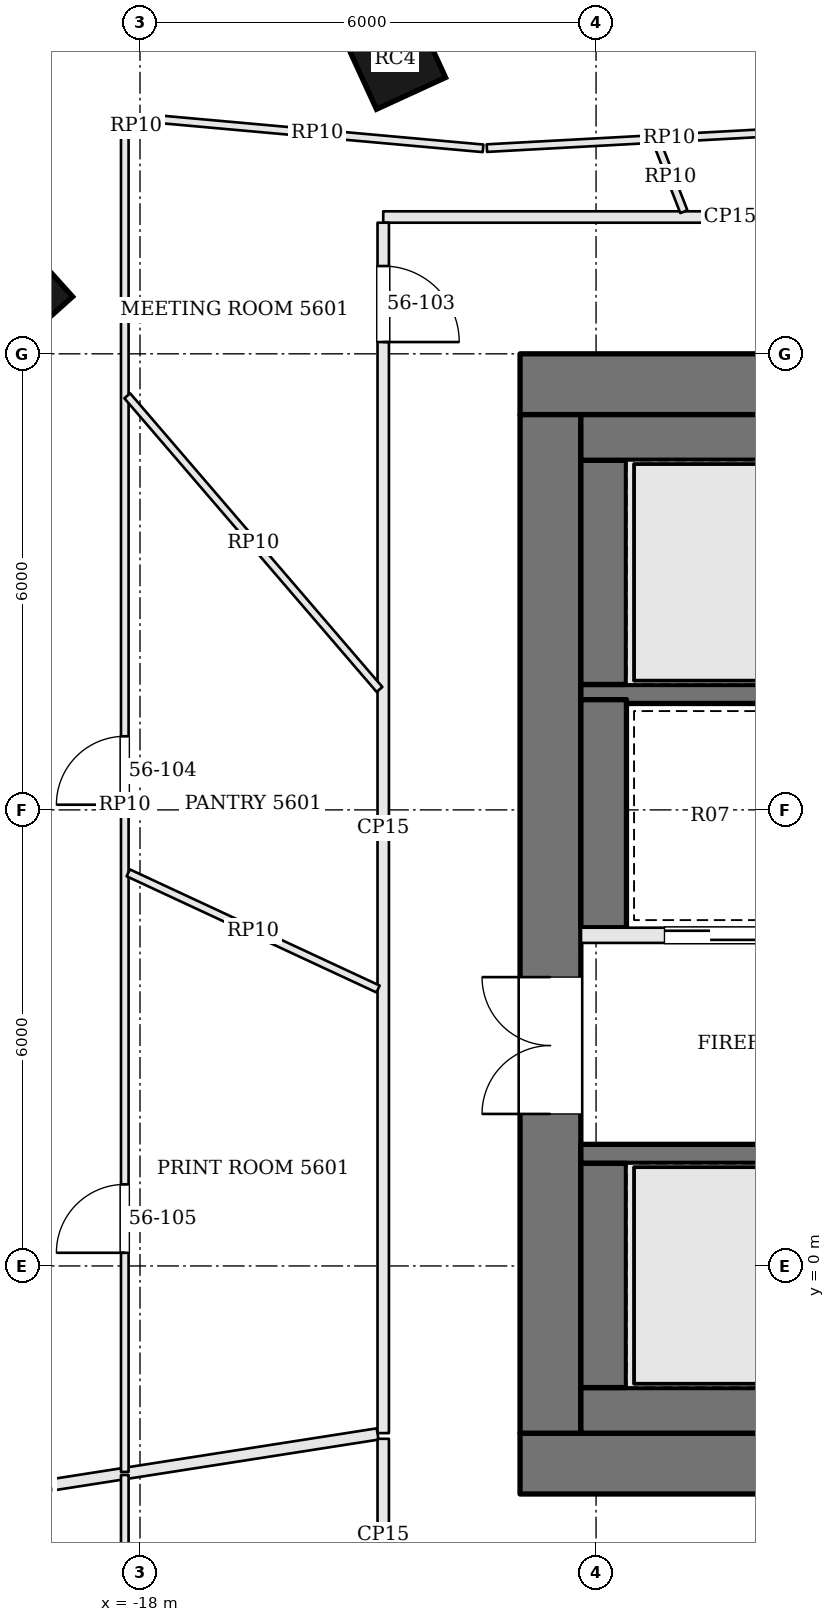
"""IFC4 building model, lengths in metres.
Left out: names, types, materials, properties, quantities, classifications, styles, units other than length and angle.
Written with IfcOpenShell. Run it as: python <this file> out.ifc"""

import sys

from ifc_helpers import new_model, si_unit, direction, frame, frame_2d, origin, origin_2d, place, context, subcontext, project, spatial, rectangle, extrude, element, fill, save


model = new_model("IFC4")
c1 = context("Model", 3, precision=1e-05, world=origin(), true_north=direction((0.0, 1.0)))
c2 = subcontext(c1, "Body", "Model", "MODEL_VIEW")
j1 = project(units=[si_unit("LENGTHUNIT", "METRE"), si_unit("PLANEANGLEUNIT", "RADIAN")], contexts=[c1])
p1 = place(None, origin())
s1 = spatial("IfcSite", under=j1, at=p1, CompositionType="ELEMENT")
p2 = place(p1, origin())
s2 = spatial("IfcBuilding", under=s1, at=p2, CompositionType="ELEMENT")
p3 = place(p2, frame((0.0, 0.0, 229.2)))
s3 = spatial("IfcBuildingStorey", under=s2, at=p3, CompositionType="ELEMENT", Elevation=229.2)
p4 = place(p3, frame((-13.0, 11.6, 0.0), z_axis=(0.0, 0.0, 1.0), x_axis=(1.0, 0.0, 0.0)))
e1 = element("IfcWall", 1, at=p4, inside=s3, PredefinedType="SHEAR", context=c2, shape_type="SweptSolid", body=[
    extrude(rectangle(XDim=26.0, YDim=0.8, at=frame_2d((13.0, 0.0))), origin(), (0.0, 0.0, 1.0), 3.9),
])
p5 = place(p4, frame((8.575, 0.0, 0.0)))
e2 = element("IfcOpeningElement", 2, at=p5, cuts=e1, PredefinedType="OPENING", context=c2, shape_type="SweptSolid", body=[
    extrude(rectangle(XDim=0.7, YDim=2.1, at=frame_2d((0.35, 1.05))), frame((0.0, 0.41, 0.0), z_axis=(0.0, -1.0, 0.0), x_axis=(1.0, 0.0, 0.0)), (0.0, 0.0, 1.0), 0.82),
])
p6 = place(p4, frame((10.625, 0.0, 0.0)))
e3 = element("IfcOpeningElement", 3, at=p6, cuts=e1, PredefinedType="OPENING", context=c2, shape_type="SweptSolid", body=[
    extrude(rectangle(XDim=0.7, YDim=2.1, at=frame_2d((0.35, 1.05))), frame((0.0, 0.41, 0.0), z_axis=(0.0, -1.0, 0.0), x_axis=(1.0, 0.0, 0.0)), (0.0, 0.0, 1.0), 0.82),
])
p7 = place(p4, frame((13.325, 0.0, 0.0)))
e4 = element("IfcOpeningElement", 4, at=p7, cuts=e1, PredefinedType="OPENING", context=c2, shape_type="SweptSolid", body=[
    extrude(rectangle(XDim=1.0, YDim=2.1, at=frame_2d((0.5, 1.05))), frame((0.0, 0.41, 0.0), z_axis=(0.0, -1.0, 0.0), x_axis=(1.0, 0.0, 0.0)), (0.0, 0.0, 1.0), 0.82),
])
p8 = place(p4, frame((15.65, 0.0, 0.0)))
e5 = element("IfcOpeningElement", 5, at=p8, cuts=e1, PredefinedType="OPENING", context=c2, shape_type="SweptSolid", body=[
    extrude(rectangle(XDim=1.0, YDim=2.1, at=frame_2d((0.5, 1.05))), frame((0.0, 0.41, 0.0), z_axis=(0.0, -1.0, 0.0), x_axis=(1.0, 0.0, 0.0)), (0.0, 0.0, 1.0), 0.82),
])
p9 = place(p3, frame((-13.0, -2.6, 0.0), z_axis=(0.0, 0.0, 1.0), x_axis=(1.0, 0.0, 0.0)))
e6 = element("IfcWall", 6, at=p9, inside=s3, PredefinedType="SHEAR", context=c2, shape_type="SweptSolid", body=[
    extrude(rectangle(XDim=26.0, YDim=0.8, at=frame_2d((13.0, 0.0))), origin(), (0.0, 0.0, 1.0), 3.9),
])
p10 = place(p9, frame((9.475, 0.0, 0.0)))
e7 = element("IfcOpeningElement", 7, at=p10, cuts=e6, PredefinedType="OPENING", context=c2, shape_type="SweptSolid", body=[
    extrude(rectangle(XDim=0.9, YDim=2.1, at=frame_2d((0.45, 1.05))), frame((0.0, 0.41, 0.0), z_axis=(0.0, -1.0, 0.0), x_axis=(1.0, 0.0, 0.0)), (0.0, 0.0, 1.0), 0.82),
])
p11 = place(p9, frame((12.75, 0.0, 0.0)))
e8 = element("IfcOpeningElement", 8, at=p11, cuts=e6, PredefinedType="OPENING", context=c2, shape_type="SweptSolid", body=[
    extrude(rectangle(XDim=0.9, YDim=2.1, at=frame_2d((0.45, 1.05))), frame((0.0, 0.41, 0.0), z_axis=(0.0, -1.0, 0.0), x_axis=(1.0, 0.0, 0.0)), (0.0, 0.0, 1.0), 0.82),
])
p12 = place(p9, frame((15.05, 0.0, 0.0)))
e9 = element("IfcOpeningElement", 9, at=p12, cuts=e6, PredefinedType="OPENING", context=c2, shape_type="SweptSolid", body=[
    extrude(rectangle(XDim=1.0, YDim=2.1, at=frame_2d((0.5, 1.05))), frame((0.0, 0.41, 0.0), z_axis=(0.0, -1.0, 0.0), x_axis=(1.0, 0.0, 0.0)), (0.0, 0.0, 1.0), 0.82),
])
p13 = place(p9, frame((16.825, 0.0, 0.0)))
e10 = element("IfcOpeningElement", 10, at=p13, cuts=e6, PredefinedType="OPENING", context=c2, shape_type="SweptSolid", body=[
    extrude(rectangle(XDim=0.7, YDim=2.1, at=frame_2d((0.35, 1.05))), frame((0.0, 0.41, 0.0), z_axis=(0.0, -1.0, 0.0), x_axis=(1.0, 0.0, 0.0)), (0.0, 0.0, 1.0), 0.82),
])
p14 = place(p3, frame((-12.6, -2.2, 0.0), z_axis=(0.0, 0.0, 1.0), x_axis=(0.0, 1.0, 0.0)))
e11 = element("IfcWall", 11, at=p14, inside=s3, PredefinedType="SHEAR", context=c2, shape_type="SweptSolid", body=[
    extrude(rectangle(XDim=13.4, YDim=0.8, at=frame_2d((6.7, 0.0))), origin(), (0.0, 0.0, 1.0), 3.9),
])
p15 = place(p14, frame((4.2, 0.0, 0.0)))
e12 = element("IfcOpeningElement", 12, at=p15, cuts=e11, PredefinedType="OPENING", context=c2, shape_type="SweptSolid", body=[
    extrude(rectangle(XDim=1.8, YDim=2.1, at=frame_2d((0.9, 1.05))), frame((0.0, 0.41, 0.0), z_axis=(0.0, -1.0, 0.0), x_axis=(1.0, 0.0, 0.0)), (0.0, 0.0, 1.0), 0.82),
])
for number, where, z_axis, x_axis in (
    (13, (-14.643, 15.881, 0.0), (0.0, 0.0, 1.0), (-0.909, -0.417, 0.0)),
    (14, (-19.593, 12.79, 0.0), (0.0, 0.0, 1.0), (-0.744, -0.668, 0.0)),
):
    element("IfcColumn", number, at=place(p3, frame(where, z_axis=z_axis, x_axis=x_axis)), inside=s3, PredefinedType="COLUMN", context=c2, shape_type="SweptSolid", body=[
        extrude(rectangle(XDim=1.0, YDim=1.0, at=origin_2d()), origin(), (0.0, 0.0, 1.0), 3.9),
    ])
p16 = place(p3, frame((-12.2, 1.475, 0.0), z_axis=(0.0, 0.0, 1.0), x_axis=(1.0, 0.0, 0.0)))
e15 = element("IfcWall", 15, at=p16, inside=s3, PredefinedType="SOLIDWALL", context=c2, shape_type="SweptSolid", body=[
    extrude(rectangle(XDim=7.1, YDim=0.25, at=frame_2d((3.55, 0.0))), origin(), (0.0, 0.0, 1.0), 3.7),
])
p17 = place(p16, frame((5.8, 0.0, 0.0)))
e16 = element("IfcOpeningElement", 16, at=p17, cuts=e15, PredefinedType="OPENING", context=c2, shape_type="SweptSolid", body=[
    extrude(rectangle(XDim=1.2, YDim=2.1, at=frame_2d((0.6, 1.05))), frame((0.0, 0.135, 0.0), z_axis=(0.0, -1.0, 0.0), x_axis=(1.0, 0.0, 0.0)), (0.0, 0.0, 1.0), 0.27),
])
p18 = place(p3, frame((-12.2, 4.35, 0.0), z_axis=(0.0, 0.0, 1.0), x_axis=(1.0, 0.0, 0.0)))
e17 = element("IfcWall", 17, at=p18, inside=s3, PredefinedType="SOLIDWALL", context=c2, shape_type="SweptSolid", body=[
    extrude(rectangle(XDim=7.1, YDim=0.2, at=frame_2d((3.55, 0.0))), origin(), (0.0, 0.0, 1.0), 3.7),
])
p19 = place(p18, frame((4.4, 0.0, 0.0)))
e18 = element("IfcOpeningElement", 18, at=p19, cuts=e17, PredefinedType="OPENING", context=c2, shape_type="SweptSolid", body=[
    extrude(rectangle(XDim=1.2, YDim=2.1, at=frame_2d((0.6, 1.05))), frame((0.0, 0.11, 0.0), z_axis=(0.0, -1.0, 0.0), x_axis=(1.0, 0.0, 0.0)), (0.0, 0.0, 1.0), 0.22),
])
p20 = place(p18, frame((1.1, 0.0, 0.0)))
e19 = element("IfcOpeningElement", 19, at=p20, cuts=e17, PredefinedType="OPENING", context=c2, shape_type="SweptSolid", body=[
    extrude(rectangle(XDim=1.2, YDim=2.1, at=frame_2d((0.6, 1.05))), frame((0.0, 0.11, 0.0), z_axis=(0.0, -1.0, 0.0), x_axis=(1.0, 0.0, 0.0)), (0.0, 0.0, 1.0), 0.22),
])
p21 = place(p3, frame((-12.2, 7.525, 0.0), z_axis=(0.0, 0.0, 1.0), x_axis=(1.0, 0.0, 0.0)))
e20 = element("IfcWall", 20, at=p21, inside=s3, PredefinedType="SOLIDWALL", context=c2, shape_type="SweptSolid", body=[
    extrude(rectangle(XDim=7.1, YDim=0.25, at=frame_2d((3.55, 0.0))), origin(), (0.0, 0.0, 1.0), 3.7),
])
p22 = place(p21, frame((5.8, 0.0, 0.0)))
e21 = element("IfcOpeningElement", 21, at=p22, cuts=e20, PredefinedType="OPENING", context=c2, shape_type="SweptSolid", body=[
    extrude(rectangle(XDim=1.2, YDim=2.1, at=frame_2d((0.6, 1.05))), frame((0.0, 0.135, 0.0), z_axis=(0.0, -1.0, 0.0), x_axis=(1.0, 0.0, 0.0)), (0.0, 0.0, 1.0), 0.27),
])
p23 = place(p3, frame((-12.2, -1.9, 0.0), z_axis=(0.0, 0.0, 1.0), x_axis=(1.0, 0.0, 0.0)))
e22 = element("IfcWall", 22, at=p23, inside=s3, PredefinedType="SOLIDWALL", context=c2, shape_type="SweptSolid", body=[
    extrude(rectangle(XDim=7.1, YDim=0.6, at=frame_2d((3.55, 0.0))), origin(), (0.0, 0.0, 1.0), 3.7),
])
p24 = place(p3, frame((-11.9, -1.6, 0.0), z_axis=(0.0, 0.0, 1.0), x_axis=(0.0, 1.0, 0.0)))
e23 = element("IfcWall", 23, at=p24, inside=s3, PredefinedType="SOLIDWALL", context=c2, shape_type="SweptSolid", body=[
    extrude(rectangle(XDim=2.95, YDim=0.6, at=frame_2d((1.475, 0.0))), origin(), (0.0, 0.0, 1.0), 3.7),
])
p25 = place(p3, frame((-11.9, 4.45, 0.0), z_axis=(0.0, 0.0, 1.0), x_axis=(0.0, 1.0, 0.0)))
e24 = element("IfcWall", 24, at=p25, inside=s3, PredefinedType="SOLIDWALL", context=c2, shape_type="SweptSolid", body=[
    extrude(rectangle(XDim=3.0, YDim=0.6, at=frame_2d((1.5, 0.0))), origin(), (0.0, 0.0, 1.0), 3.7),
])
p26 = place(p3, frame((-11.9, 7.65, 0.0), z_axis=(0.0, 0.0, 1.0), x_axis=(0.0, 1.0, 0.0)))
e25 = element("IfcWall", 25, at=p26, inside=s3, PredefinedType="SOLIDWALL", context=c2, shape_type="SweptSolid", body=[
    extrude(rectangle(XDim=2.95, YDim=0.6, at=frame_2d((1.475, 0.0))), origin(), (0.0, 0.0, 1.0), 3.7),
])
p27 = place(p3, frame((-12.2, 10.9, 0.0), z_axis=(0.0, 0.0, 1.0), x_axis=(1.0, 0.0, 0.0)))
e26 = element("IfcWall", 26, at=p27, inside=s3, PredefinedType="SOLIDWALL", context=c2, shape_type="SweptSolid", body=[
    extrude(rectangle(XDim=7.1, YDim=0.6, at=frame_2d((3.55, 0.0))), origin(), (0.0, 0.0, 1.0), 3.7),
])
p28 = place(p3, frame((-5.674, 13.8, 0.0), z_axis=(0.0, 0.0, 1.0), x_axis=(-1.0, 0.0, 0.0)))
e27 = element("IfcWall", 27, at=p28, inside=s3, PredefinedType="PARTITIONING", context=c2, shape_type="SweptSolid", body=[
    extrude(rectangle(XDim=9.126, YDim=0.15, at=frame_2d((4.563, 0.0))), origin(), (0.0, 0.0, 1.0), 3.084),
])
p29 = place(p28, frame((1.672, 0.0, 0.0)))
e28 = element("IfcOpeningElement", 28, at=p29, cuts=e27, PredefinedType="OPENING", context=c2, shape_type="SweptSolid", body=[
    extrude(rectangle(XDim=1.8, YDim=2.1, at=frame_2d((0.9, 1.05))), frame((0.0, 0.085, 0.0), z_axis=(0.0, -1.0, 0.0), x_axis=(1.0, 0.0, 0.0)), (0.0, 0.0, 1.0), 0.17),
])
p30 = place(p3, frame((-14.8, 13.725, 0.0), z_axis=(0.0, 0.0, 1.0), x_axis=(0.0, -1.0, 0.0)))
e29 = element("IfcWall", 29, at=p30, inside=s3, PredefinedType="PARTITIONING", context=c2, shape_type="SweptSolid", body=[
    extrude(rectangle(XDim=15.924, YDim=0.15, at=frame_2d((7.962, 0.0))), origin(), (0.0, 0.0, 1.0), 3.084),
])
p31 = place(p30, frame((0.57, 0.0, 0.0)))
e30 = element("IfcOpeningElement", 30, at=p31, cuts=e29, PredefinedType="OPENING", context=c2, shape_type="SweptSolid", body=[
    extrude(rectangle(XDim=1.0, YDim=2.4, at=frame_2d((0.5, 1.2))), frame((0.0, 0.085, 0.0), z_axis=(0.0, -1.0, 0.0), x_axis=(1.0, 0.0, 0.0)), (0.0, 0.0, 1.0), 0.17),
])
p32 = place(p3, frame((-24.077, -3.648, 0.0), z_axis=(0.0, 0.0, 1.0), x_axis=(0.988026771809, 0.154282527163, 0.0)))
e31 = element("IfcWall", 31, at=p32, inside=s3, PredefinedType="PARTITIONING", context=c2, shape_type="SweptSolid", body=[
    extrude(rectangle(XDim=9.314, YDim=0.15, at=frame_2d((4.657, 0.0))), origin(), (0.0, 0.0, 1.0), 3.234),
])
p33 = place(p3, frame((-14.8, -2.274, 0.0), z_axis=(0.0, 0.0, 1.0), x_axis=(0.0, -1.0, 0.0)))
e32 = element("IfcWall", 32, at=p33, inside=s3, PredefinedType="PARTITIONING", context=c2, shape_type="SweptSolid", body=[
    extrude(rectangle(XDim=2.526, YDim=0.15, at=frame_2d((1.263, 0.0))), origin(), (0.0, 0.0, 1.0), 3.084),
])
p34 = place(p3, frame((-18.2, 14.901, 0.0), z_axis=(0.0, 0.0, 1.0), x_axis=(0.833509335289, 0.552505373717, 0.0)))
e33 = element("IfcWall", 33, at=p34, inside=s3, PredefinedType="PARTITIONING", context=c2, shape_type="SweptSolid", body=[
    extrude(rectangle(XDim=0.36, YDim=0.1, at=frame_2d((0.18, 0.0))), origin(), (0.0, 0.0, 1.0), 3.084),
])
p35 = place(p3, frame((-17.85, 15.096, 0.0), z_axis=(0.0, 0.0, 1.0), x_axis=(0.99598766082, -0.089490667074, 0.0)))
e34 = element("IfcWall", 34, at=p35, inside=s3, PredefinedType="PARTITIONING", context=c2, shape_type="SweptSolid", body=[
    extrude(rectangle(XDim=4.381, YDim=0.1, at=frame_2d((2.191, 0.0))), origin(), (0.0, 0.0, 1.0), 3.084),
])
p36 = place(p3, frame((-13.437, 14.706, 0.0), z_axis=(0.0, 0.0, 1.0), x_axis=(0.998525882111, 0.054277645072, 0.0)))
e35 = element("IfcWall", 35, at=p36, inside=s3, PredefinedType="PARTITIONING", context=c2, shape_type="SweptSolid", body=[
    extrude(rectangle(XDim=4.808, YDim=0.1, at=frame_2d((2.404, 0.0))), origin(), (0.0, 0.0, 1.0), 3.084),
])
p37 = place(p3, frame((-18.2, -2.71, 0.0), z_axis=(0.0, 0.0, 1.0), x_axis=(0.0, 1.0, 0.0)))
e36 = element("IfcWall", 36, at=p37, inside=s3, PredefinedType="PARTITIONING", context=c2, shape_type="SweptSolid", body=[
    extrude(rectangle(XDim=17.561, YDim=0.1, at=frame_2d((8.781, 0.0))), origin(), (0.0, 0.0, 1.0), 3.084),
])
p38 = place(p37, frame((8.778, 0.0, 0.0)))
e37 = element("IfcOpeningElement", 37, at=p38, cuts=e36, PredefinedType="OPENING", context=c2, shape_type="SweptSolid", body=[
    extrude(rectangle(XDim=0.9, YDim=2.1, at=frame_2d((0.45, 1.05))), frame((0.0, 0.06, 0.0), z_axis=(0.0, -1.0, 0.0), x_axis=(1.0, 0.0, 0.0)), (0.0, 0.0, 1.0), 0.12),
])
p39 = place(p37, frame((2.883, 0.0, 0.0)))
e38 = element("IfcOpeningElement", 38, at=p39, cuts=e36, PredefinedType="OPENING", context=c2, shape_type="SweptSolid", body=[
    extrude(rectangle(XDim=0.9, YDim=2.1, at=frame_2d((0.45, 1.05))), frame((0.0, 0.06, 0.0), z_axis=(0.0, -1.0, 0.0), x_axis=(1.0, 0.0, 0.0)), (0.0, 0.0, 1.0), 0.12),
])
p40 = place(p3, frame((-10.845, 13.87, 0.0), z_axis=(0.0, 0.0, 1.0), x_axis=(-0.362759705936, 0.931882715662, 0.0)))
e39 = element("IfcWall", 39, at=p40, inside=s3, PredefinedType="PARTITIONING", context=c2, shape_type="SweptSolid", body=[
    extrude(rectangle(XDim=0.977, YDim=0.1, at=frame_2d((0.489, 0.0))), origin(), (0.0, 0.0, 1.0), 3.084),
])
p41 = place(p3, frame((-14.849, 7.584, 0.0), z_axis=(0.0, 0.0, 1.0), x_axis=(-0.65160818205, 0.758555717852, 0.0)))
e40 = element("IfcWall", 40, at=p41, inside=s3, PredefinedType="PARTITIONING", context=c2, shape_type="SweptSolid", body=[
    extrude(rectangle(XDim=5.093, YDim=0.1, at=frame_2d((2.546, 0.0))), origin(), (0.0, 0.0, 1.0), 3.084),
])
p42 = place(p3, frame((-14.868, 3.644, 0.0), z_axis=(0.0, 0.0, 1.0), x_axis=(-0.906769022566, 0.421627726455, 0.0)))
e41 = element("IfcWall", 41, at=p42, inside=s3, PredefinedType="PARTITIONING", context=c2, shape_type="SweptSolid", body=[
    extrude(rectangle(XDim=3.625, YDim=0.1, at=frame_2d((1.812, 0.0))), origin(), (0.0, 0.0, 1.0), 3.084),
])
p43 = place(p3, frame((-18.2, -8.15, 0.0), z_axis=(0.0, 0.0, 1.0), x_axis=(0.0, 1.0, 0.0)))
e42 = element("IfcWall", 42, at=p43, inside=s3, PredefinedType="PARTITIONING", context=c2, shape_type="SweptSolid", body=[
    extrude(rectangle(XDim=5.4, YDim=0.1, at=frame_2d((2.7, 0.0))), origin(), (0.0, 0.0, 1.0), 3.084),
])
p44 = place(p43, frame((1.232, 0.0, 0.0)))
e43 = element("IfcOpeningElement", 43, at=p44, cuts=e42, PredefinedType="OPENING", context=c2, shape_type="SweptSolid", body=[
    extrude(rectangle(XDim=1.0, YDim=2.1, at=frame_2d((0.5, 1.05))), frame((0.0, 0.06, 0.0), z_axis=(0.0, -1.0, 0.0), x_axis=(1.0, 0.0, 0.0)), (0.0, 0.0, 1.0), 0.12),
])
p45 = place(p15, origin())
e44 = element("IfcDoor", 44, at=p45, inside=s3, OperationType="DOUBLE_DOOR_SINGLE_SWING", PredefinedType="DOOR", context=c2, shape_type="SweptSolid", body=[
    extrude(rectangle(XDim=1.8, YDim=2.1, at=frame_2d((0.9, 1.05))), frame((0.0, 0.025, 0.0), z_axis=(0.0, -1.0, 0.0), x_axis=(1.0, 0.0, 0.0)), (0.0, 0.0, 1.0), 0.05),
])
fill(e12, e44)
p46 = place(p20, origin())
e45 = element("IfcDoor", 45, at=p46, inside=s3, OperationType="SLIDING_TO_RIGHT", PredefinedType="DOOR", context=c2, shape_type="SweptSolid", body=[
    extrude(rectangle(XDim=1.2, YDim=2.1, at=frame_2d((0.6, 1.05))), frame((0.0, 0.025, 0.0), z_axis=(0.0, -1.0, 0.0), x_axis=(1.0, 0.0, 0.0)), (0.0, 0.0, 1.0), 0.05),
])
fill(e19, e45)
p47 = place(p31, origin())
e46 = element("IfcDoor", 46, at=p47, inside=s3, OperationType="SINGLE_SWING_RIGHT", PredefinedType="DOOR", context=c2, shape_type="SweptSolid", body=[
    extrude(rectangle(XDim=1.0, YDim=2.4, at=frame_2d((0.5, 1.2))), frame((0.0, 0.025, 0.0), z_axis=(0.0, -1.0, 0.0), x_axis=(1.0, 0.0, 0.0)), (0.0, 0.0, 1.0), 0.05),
])
fill(e30, e46)
p48 = place(p38, origin())
e47 = element("IfcDoor", 47, at=p48, inside=s3, OperationType="SINGLE_SWING_LEFT", PredefinedType="DOOR", context=c2, shape_type="SweptSolid", body=[
    extrude(rectangle(XDim=0.9, YDim=2.1, at=frame_2d((0.45, 1.05))), frame((0.0, 0.025, 0.0), z_axis=(0.0, -1.0, 0.0), x_axis=(1.0, 0.0, 0.0)), (0.0, 0.0, 1.0), 0.05),
])
fill(e37, e47)
p49 = place(p39, origin())
e48 = element("IfcDoor", 48, at=p49, inside=s3, OperationType="SINGLE_SWING_LEFT", PredefinedType="DOOR", context=c2, shape_type="SweptSolid", body=[
    extrude(rectangle(XDim=0.9, YDim=2.1, at=frame_2d((0.45, 1.05))), frame((0.0, 0.025, 0.0), z_axis=(0.0, -1.0, 0.0), x_axis=(1.0, 0.0, 0.0)), (0.0, 0.0, 1.0), 0.05),
])
fill(e38, e48)
save(model, sys.argv[1])
